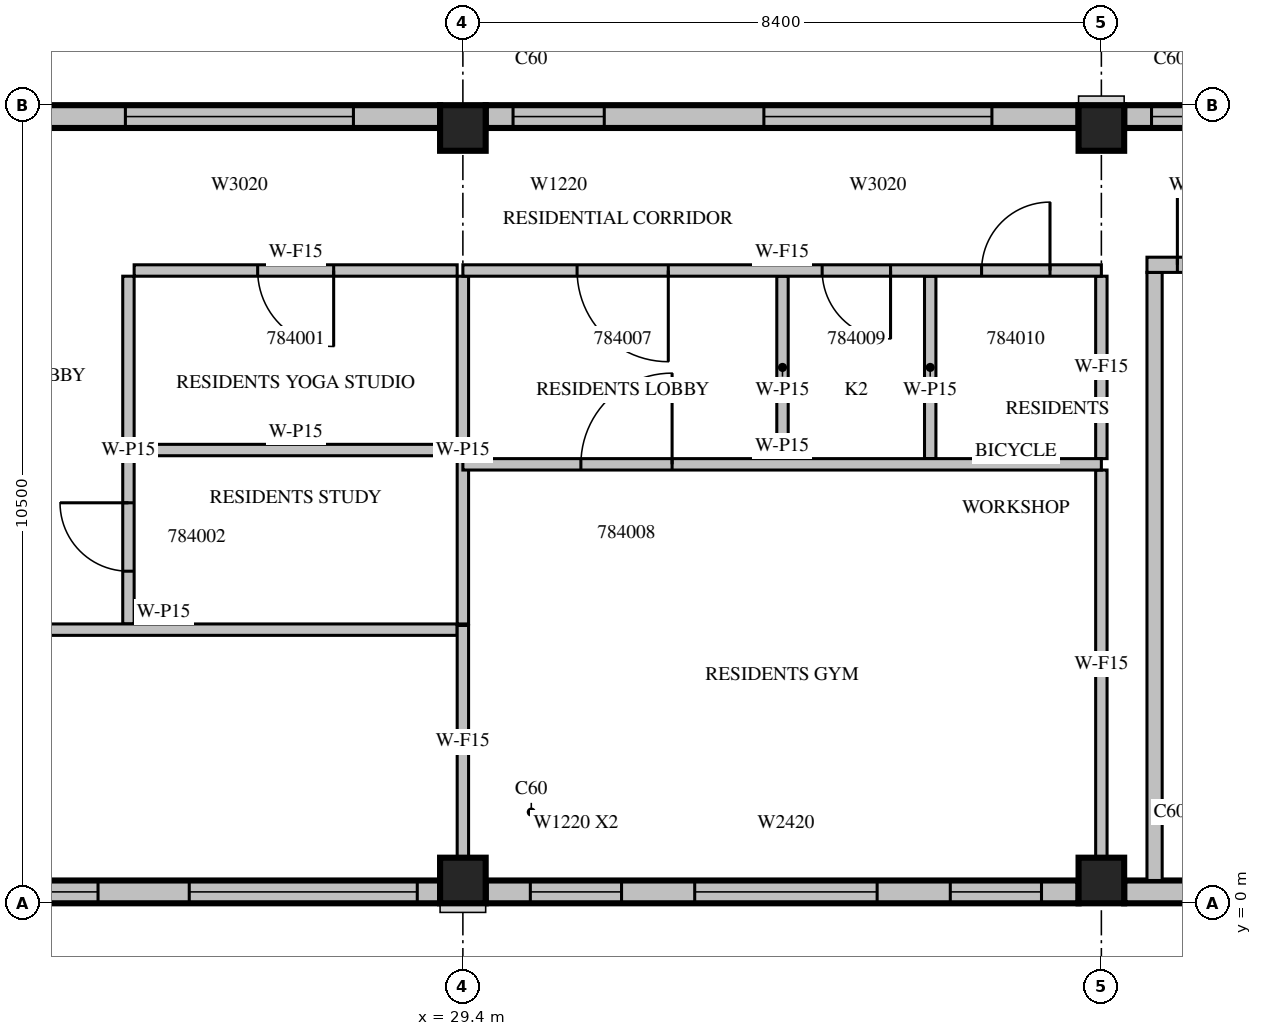
"""IFC4 building model, lengths in metres.
Left out: names, types, materials, properties, quantities, classifications, styles, units other than length and angle.
Written with IfcOpenShell. Run it as: python <this file> out.ifc"""

import sys

from ifc_helpers import new_model, si_unit, direction, frame, frame_2d, origin, origin_2d, place, context, subcontext, project, spatial, rectangle, extrude, source, transform, mapped, element, fill, save


model = new_model("IFC4")
c1 = context("Model", 3, precision=1e-05, world=origin(), true_north=direction((0.0, 1.0)))
c2 = subcontext(c1, "Body", "Model", "MODEL_VIEW")
j1 = project(units=[si_unit("LENGTHUNIT", "METRE"), si_unit("PLANEANGLEUNIT", "RADIAN")], contexts=[c1])
p1 = place(None, origin())
s1 = spatial("IfcSite", under=j1, at=p1, CompositionType="ELEMENT")
p2 = place(p1, origin())
s2 = spatial("IfcBuilding", under=s1, at=p2, CompositionType="ELEMENT")
p3 = place(p2, frame((0.0, 0.0, 354.5)))
s3 = spatial("IfcBuildingStorey", under=s2, at=p3, CompositionType="ELEMENT", Elevation=354.5)
m1 = source(origin(), c2, "Body", "SweptSolid", [
    extrude(rectangle(XDim=0.6, YDim=0.6, at=origin_2d()), origin(), (0.0, 0.0, 1.0), 3.5),
])
for number, where, z_axis, x_axis in (
    (1, (29.4, 0.3, 0.0), (0.0, 0.0, 1.0), (1.0, 0.0, 0.0)),
    (2, (37.8, 0.3, 0.0), (0.0, 0.0, 1.0), (1.0, 0.0, 0.0)),
    (3, (29.4, 10.2, 0.0), (0.0, 0.0, 1.0), (1.0, 0.0, 0.0)),
    (4, (37.8, 10.2, 0.0), (0.0, 0.0, 1.0), (1.0, 0.0, 0.0)),
):
    element("IfcColumn", number, at=place(p3, frame(where, z_axis=z_axis, x_axis=x_axis)), inside=s3, PredefinedType="COLUMN", context=c2, shape_type="MappedRepresentation", body=[
        mapped(m1, transform((0.0, 0.0, 0.0), scale=1.0)),
    ])
m2 = source(origin(), c2, "Body", "SweptSolid", [
    extrude(rectangle(XDim=7.8, YDim=0.3, at=frame_2d((3.9, 0.0))), origin(), (0.0, 0.0, 1.0), 3.1),
])
p4 = place(p3, frame((21.3, 0.15, 0.0), z_axis=(0.0, 0.0, 1.0), x_axis=(1.0, 0.0, 0.0)))
e5 = element("IfcWall", 5, at=p4, inside=s3, PredefinedType="STANDARD", context=c2, shape_type="MappedRepresentation", body=[
    mapped(m2, transform((0.0, 0.0, 0.0), scale=1.0)),
])
m3 = source(origin(), c2, "Body", "SweptSolid", [
    extrude(rectangle(XDim=3.0, YDim=2.0, at=frame_2d((1.5, 1.0))), frame((0.0, 0.16, 0.0), z_axis=(0.0, -1.0, 0.0), x_axis=(1.0, 0.0, 0.0)), (0.0, 0.0, 1.0), 0.32),
])
p5 = place(p4, frame((0.3, 0.0, 0.6)))
e6 = element("IfcOpeningElement", 6, at=p5, cuts=e5, PredefinedType="OPENING", context=c2, shape_type="MappedRepresentation", body=[
    mapped(m3, transform((0.0, 0.0, 0.0), scale=1.0)),
])
p6 = place(p4, frame((4.5, 0.0, 0.6)))
e7 = element("IfcOpeningElement", 7, at=p6, cuts=e5, PredefinedType="OPENING", context=c2, shape_type="MappedRepresentation", body=[
    mapped(m3, transform((0.0, 0.0, 0.0), scale=1.0)),
])
p7 = place(p3, frame((29.7, 0.15, 0.0), z_axis=(0.0, 0.0, 1.0), x_axis=(1.0, 0.0, 0.0)))
e8 = element("IfcWall", 8, at=p7, inside=s3, PredefinedType="STANDARD", context=c2, shape_type="MappedRepresentation", body=[
    mapped(m2, transform((0.0, 0.0, 0.0), scale=1.0)),
])
m4 = source(origin(), c2, "Body", "SweptSolid", [
    extrude(rectangle(XDim=1.2, YDim=2.0, at=frame_2d((0.6, 1.0))), frame((0.0, 0.16, 0.0), z_axis=(0.0, -1.0, 0.0), x_axis=(1.0, 0.0, 0.0)), (0.0, 0.0, 1.0), 0.32),
])
p8 = place(p7, frame((0.588, 0.0, 0.6)))
e9 = element("IfcOpeningElement", 9, at=p8, cuts=e8, PredefinedType="OPENING", context=c2, shape_type="MappedRepresentation", body=[
    mapped(m4, transform((0.0, 0.0, 0.0), scale=1.0)),
])
p9 = place(p7, frame((6.112, 0.0, 0.6)))
e10 = element("IfcOpeningElement", 10, at=p9, cuts=e8, PredefinedType="OPENING", context=c2, shape_type="MappedRepresentation", body=[
    mapped(m4, transform((0.0, 0.0, 0.0), scale=1.0)),
])
m5 = source(origin(), c2, "Body", "SweptSolid", [
    extrude(rectangle(XDim=2.4, YDim=2.0, at=frame_2d((1.2, 1.0))), frame((0.0, 0.16, 0.0), z_axis=(0.0, -1.0, 0.0), x_axis=(1.0, 0.0, 0.0)), (0.0, 0.0, 1.0), 0.32),
])
p10 = place(p7, frame((2.75, 0.0, 0.6)))
e11 = element("IfcOpeningElement", 11, at=p10, cuts=e8, PredefinedType="OPENING", context=c2, shape_type="MappedRepresentation", body=[
    mapped(m5, transform((0.0, 0.0, 0.0), scale=1.0)),
])
m6 = source(origin(), c2, "Body", "SweptSolid", [
    extrude(rectangle(XDim=2.1, YDim=0.3, at=frame_2d((1.05, 0.0))), origin(), (0.0, 0.0, 1.0), 3.1),
])
p11 = place(p3, frame((38.1, 0.15, 0.0), z_axis=(0.0, 0.0, 1.0), x_axis=(1.0, 0.0, 0.0)))
e12 = element("IfcWall", 12, at=p11, inside=s3, PredefinedType="STANDARD", context=c2, shape_type="MappedRepresentation", body=[
    mapped(m6, transform((0.0, 0.0, 0.0), scale=1.0)),
])
p12 = place(p3, frame((45.9, 10.35, 0.0), z_axis=(0.0, 0.0, 1.0), x_axis=(-1.0, 0.0, 0.0)))
e13 = element("IfcWall", 13, at=p12, inside=s3, PredefinedType="STANDARD", context=c2, shape_type="MappedRepresentation", body=[
    mapped(m2, transform((0.0, 0.0, 0.0), scale=1.0)),
])
p13 = place(p12, frame((1.14, 0.0, 0.6)))
e14 = element("IfcOpeningElement", 14, at=p13, cuts=e13, PredefinedType="OPENING", context=c2, shape_type="MappedRepresentation", body=[
    mapped(m3, transform((0.0, 0.0, 0.0), scale=1.0)),
])
p14 = place(p12, frame((6.24, 0.0, 0.6)))
e15 = element("IfcOpeningElement", 15, at=p14, cuts=e13, PredefinedType="OPENING", context=c2, shape_type="MappedRepresentation", body=[
    mapped(m4, transform((0.0, 0.0, 0.0), scale=1.0)),
])
p15 = place(p3, frame((37.5, 10.35, 0.0), z_axis=(0.0, 0.0, 1.0), x_axis=(-1.0, 0.0, 0.0)))
e16 = element("IfcWall", 16, at=p15, inside=s3, PredefinedType="STANDARD", context=c2, shape_type="MappedRepresentation", body=[
    mapped(m2, transform((0.0, 0.0, 0.0), scale=1.0)),
])
p16 = place(p15, frame((1.14, 0.0, 0.6)))
e17 = element("IfcOpeningElement", 17, at=p16, cuts=e16, PredefinedType="OPENING", context=c2, shape_type="MappedRepresentation", body=[
    mapped(m3, transform((0.0, 0.0, 0.0), scale=1.0)),
])
p17 = place(p15, frame((6.24, 0.0, 0.6)))
e18 = element("IfcOpeningElement", 18, at=p17, cuts=e16, PredefinedType="OPENING", context=c2, shape_type="MappedRepresentation", body=[
    mapped(m4, transform((0.0, 0.0, 0.0), scale=1.0)),
])
m7 = source(origin(), c2, "Body", "SweptSolid", [
    extrude(rectangle(XDim=7.5, YDim=0.3, at=frame_2d((3.75, 0.0))), origin(), (0.0, 0.0, 1.0), 3.1),
])
p18 = place(p3, frame((29.1, 10.35, 0.0), z_axis=(0.0, 0.0, 1.0), x_axis=(-1.0, 0.0, 0.0)))
e19 = element("IfcWall", 19, at=p18, inside=s3, PredefinedType="STANDARD", context=c2, shape_type="MappedRepresentation", body=[
    mapped(m7, transform((0.0, 0.0, 0.0), scale=1.0)),
])
p19 = place(p18, frame((1.14, 0.0, 0.6)))
e20 = element("IfcOpeningElement", 20, at=p19, cuts=e19, PredefinedType="OPENING", context=c2, shape_type="MappedRepresentation", body=[
    mapped(m3, transform((0.0, 0.0, 0.0), scale=1.0)),
])
m8 = source(origin(), c2, "Body", "SweptSolid", [
    extrude(rectangle(XDim=1.8, YDim=2.0, at=frame_2d((0.9, 1.0))), frame((0.0, 0.16, 0.0), z_axis=(0.0, -1.0, 0.0), x_axis=(1.0, 0.0, 0.0)), (0.0, 0.0, 1.0), 0.32),
])
p20 = place(p18, frame((5.52, 0.0, 0.6)))
e21 = element("IfcOpeningElement", 21, at=p20, cuts=e19, PredefinedType="OPENING", context=c2, shape_type="MappedRepresentation", body=[
    mapped(m8, transform((0.0, 0.0, 0.0), scale=1.0)),
])
m9 = source(origin(), c2, "Body", "SweptSolid", [
    extrude(rectangle(XDim=8.0, YDim=0.2, at=frame_2d((4.0, 0.0))), origin(), (0.0, 0.0, 1.0), 3.1),
])
p21 = place(p3, frame((38.5, 0.3, 0.0), z_axis=(0.0, 0.0, 1.0), x_axis=(0.0, 1.0, 0.0)))
e22 = element("IfcWall", 22, at=p21, inside=s3, PredefinedType="PARTITIONING", context=c2, shape_type="MappedRepresentation", body=[
    mapped(m9, transform((0.0, 0.0, 0.0), scale=1.0)),
])
m10 = source(origin(), c2, "Body", "SweptSolid", [
    extrude(rectangle(XDim=5.45, YDim=0.2, at=frame_2d((2.725, 0.0))), origin(), (0.0, 0.0, 1.0), 3.1),
])
p22 = place(p3, frame((38.4, 8.4, 0.0), z_axis=(0.0, 0.0, 1.0), x_axis=(1.0, 0.0, 0.0)))
e23 = element("IfcWall", 23, at=p22, inside=s3, PredefinedType="PARTITIONING", context=c2, shape_type="MappedRepresentation", body=[
    mapped(m10, transform((0.0, 0.0, 0.0), scale=1.0)),
])
m11 = source(origin(), c2, "Body", "SweptSolid", [
    extrude(rectangle(XDim=1.2, YDim=2.1, at=frame_2d((0.6, 1.05))), frame((0.0, 0.11, 0.0), z_axis=(0.0, -1.0, 0.0), x_axis=(1.0, 0.0, 0.0)), (0.0, 0.0, 1.0), 0.22),
])
p23 = place(p22, frame((0.4, 0.0, 0.0)))
e24 = element("IfcOpeningElement", 24, at=p23, cuts=e23, PredefinedType="OPENING", context=c2, shape_type="MappedRepresentation", body=[
    mapped(m11, transform((0.0, 0.0, 0.0), scale=1.0)),
])
m12 = source(origin(), c2, "Body", "SweptSolid", [
    extrude(rectangle(XDim=0.9, YDim=2.1, at=frame_2d((0.45, 1.05))), frame((0.0, 0.11, 0.0), z_axis=(0.0, -1.0, 0.0), x_axis=(1.0, 0.0, 0.0)), (0.0, 0.0, 1.0), 0.22),
])
p24 = place(p22, frame((3.25, 0.0, 0.0)))
e25 = element("IfcOpeningElement", 25, at=p24, cuts=e23, PredefinedType="OPENING", context=c2, shape_type="MappedRepresentation", body=[
    mapped(m12, transform((0.0, 0.0, 0.0), scale=1.0)),
])
m13 = source(origin(), c2, "Body", "SweptSolid", [
    extrude(rectangle(XDim=4.575, YDim=0.15, at=frame_2d((2.288, 0.0))), origin(), (0.0, 0.0, 1.0), 3.1),
])
p25 = place(p3, frame((25.0, 8.25, 0.0), z_axis=(0.0, 0.0, 1.0), x_axis=(0.0, -1.0, 0.0)))
e26 = element("IfcWall", 26, at=p25, inside=s3, PredefinedType="PARTITIONING", context=c2, shape_type="MappedRepresentation", body=[
    mapped(m13, transform((0.0, 0.0, 0.0), scale=1.0)),
])
m14 = source(origin(), c2, "Body", "SweptSolid", [
    extrude(rectangle(XDim=0.9, YDim=2.1, at=frame_2d((0.45, 1.05))), frame((0.0, 0.085, 0.0), z_axis=(0.0, -1.0, 0.0), x_axis=(1.0, 0.0, 0.0)), (0.0, 0.0, 1.0), 0.17),
])
p26 = place(p25, frame((2.981, 0.0, 0.0)))
e27 = element("IfcOpeningElement", 27, at=p26, cuts=e26, PredefinedType="OPENING", context=c2, shape_type="MappedRepresentation", body=[
    mapped(m14, transform((0.0, 0.0, 0.0), scale=1.0)),
])
p27 = place(p3, frame((29.4, 3.675, 0.0), z_axis=(0.0, 0.0, 1.0), x_axis=(0.0, 1.0, 0.0)))
e28 = element("IfcWall", 28, at=p27, inside=s3, PredefinedType="PARTITIONING", context=c2, shape_type="MappedRepresentation", body=[
    mapped(m13, transform((0.0, 0.0, 0.0), scale=1.0)),
])
p28 = place(p3, frame((29.325, 8.325, 0.0), z_axis=(0.0, 0.0, 1.0), x_axis=(-1.0, 0.0, 0.0)))
e29 = element("IfcWall", 29, at=p28, inside=s3, PredefinedType="PARTITIONING", context=c2, shape_type="SweptSolid", body=[
    extrude(rectangle(XDim=4.25, YDim=0.15, at=frame_2d((2.125, 0.0))), origin(), (0.0, 0.0, 1.0), 3.1),
])
m15 = source(origin(), c2, "Body", "SweptSolid", [
    extrude(rectangle(XDim=1.0, YDim=2.1, at=frame_2d((0.5, 1.05))), frame((0.0, 0.085, 0.0), z_axis=(0.0, -1.0, 0.0), x_axis=(1.0, 0.0, 0.0)), (0.0, 0.0, 1.0), 0.17),
])
p29 = place(p28, frame((1.625, 0.0, 0.0)))
e30 = element("IfcOpeningElement", 30, at=p29, cuts=e29, PredefinedType="OPENING", context=c2, shape_type="MappedRepresentation", body=[
    mapped(m15, transform((0.0, 0.0, 0.0), scale=1.0)),
])
m16 = source(origin(), c2, "Body", "SweptSolid", [
    extrude(rectangle(XDim=4.25, YDim=0.15, at=frame_2d((2.125, 0.0))), origin(), (0.0, 0.0, 1.0), 3.1),
])
p30 = place(p3, frame((29.325, 5.963, 0.0), z_axis=(0.0, 0.0, 1.0), x_axis=(-1.0, 0.0, 0.0)))
e31 = element("IfcWall", 31, at=p30, inside=s3, PredefinedType="PARTITIONING", context=c2, shape_type="MappedRepresentation", body=[
    mapped(m16, transform((0.0, 0.0, 0.0), scale=1.0)),
])
m17 = source(origin(), c2, "Body", "SweptSolid", [
    extrude(rectangle(XDim=7.725, YDim=0.15, at=frame_2d((3.862, 0.0))), origin(), (0.0, 0.0, 1.0), 3.1),
])
p31 = place(p3, frame((21.6, 3.6, 0.0), z_axis=(0.0, 0.0, 1.0), x_axis=(1.0, 0.0, 0.0)))
e32 = element("IfcWall", 32, at=p31, inside=s3, PredefinedType="PARTITIONING", context=c2, shape_type="MappedRepresentation", body=[
    mapped(m17, transform((0.0, 0.0, 0.0), scale=1.0)),
])
m18 = source(origin(), c2, "Body", "SweptSolid", [
    extrude(rectangle(XDim=1.2, YDim=2.1, at=frame_2d((0.6, 1.05))), frame((0.0, 0.085, 0.0), z_axis=(0.0, -1.0, 0.0), x_axis=(1.0, 0.0, 0.0)), (0.0, 0.0, 1.0), 0.17),
])
p32 = place(p31, frame((1.1, 0.0, 0.0)))
e33 = element("IfcOpeningElement", 33, at=p32, cuts=e32, PredefinedType="OPENING", context=c2, shape_type="MappedRepresentation", body=[
    mapped(m18, transform((0.0, 0.0, 0.0), scale=1.0)),
])
m19 = source(origin(), c2, "Body", "SweptSolid", [
    extrude(rectangle(XDim=2.4, YDim=0.15, at=frame_2d((1.2, 0.0))), origin(), (0.0, 0.0, 1.0), 3.1),
])
for number, where, z_axis, x_axis in (
    (34, (33.605, 5.85, 0.0), (0.0, 0.0, 1.0), (0.0, 1.0, 0.0)),
    (35, (35.548, 5.85, 0.0), (0.0, 0.0, 1.0), (0.0, 1.0, 0.0)),
):
    element("IfcWall", number, at=place(p3, frame(where, z_axis=z_axis, x_axis=x_axis)), inside=s3, PredefinedType="PARTITIONING", context=c2, shape_type="MappedRepresentation", body=[
        mapped(m19, transform((0.0, 0.0, 0.0), scale=1.0)),
    ])
m20 = source(origin(), c2, "Body", "SweptSolid", [
    extrude(rectangle(XDim=3.056, YDim=0.15, at=frame_2d((1.528, 0.0))), origin(), (0.0, 0.0, 1.0), 3.1),
])
p33 = place(p3, frame((29.4, 0.599, 0.0), z_axis=(0.0, 0.0, 1.0), x_axis=(0.0, 1.0, 0.0)))
e36 = element("IfcWall", 36, at=p33, inside=s3, PredefinedType="PARTITIONING", context=c2, shape_type="MappedRepresentation", body=[
    mapped(m20, transform((0.0, 0.0, 0.0), scale=1.0)),
])
p34 = place(p3, frame((37.8, 0.599, 0.0), z_axis=(0.0, 0.0, 1.0), x_axis=(0.0, 1.0, 0.0)))
e37 = element("IfcWall", 37, at=p34, inside=s3, PredefinedType="PARTITIONING", context=c2, shape_type="SweptSolid", body=[
    extrude(rectangle(XDim=5.101, YDim=0.15, at=frame_2d((2.55, 0.0))), origin(), (0.0, 0.0, 1.0), 3.1),
])
p35 = place(p3, frame((37.8, 5.85, 0.0), z_axis=(0.0, 0.0, 1.0), x_axis=(0.0, 1.0, 0.0)))
e38 = element("IfcWall", 38, at=p35, inside=s3, PredefinedType="PARTITIONING", context=c2, shape_type="MappedRepresentation", body=[
    mapped(m19, transform((0.0, 0.0, 0.0), scale=1.0)),
])
m21 = source(origin(), c2, "Body", "SweptSolid", [
    extrude(rectangle(XDim=8.4, YDim=0.15, at=frame_2d((4.2, 0.0))), origin(), (0.0, 0.0, 1.0), 3.1),
])
p36 = place(p3, frame((37.8, 5.775, 0.0), z_axis=(0.0, 0.0, 1.0), x_axis=(-1.0, 0.0, 0.0)))
e39 = element("IfcWall", 39, at=p36, inside=s3, PredefinedType="PARTITIONING", context=c2, shape_type="MappedRepresentation", body=[
    mapped(m21, transform((0.0, 0.0, 0.0), scale=1.0)),
])
p37 = place(p36, frame((5.648, 0.0, 0.0)))
e40 = element("IfcOpeningElement", 40, at=p37, cuts=e39, PredefinedType="OPENING", context=c2, shape_type="MappedRepresentation", body=[
    mapped(m18, transform((0.0, 0.0, 0.0), scale=1.0)),
])
p38 = place(p3, frame((37.8, 8.325, 0.0), z_axis=(0.0, 0.0, 1.0), x_axis=(-1.0, 0.0, 0.0)))
e41 = element("IfcWall", 41, at=p38, inside=s3, PredefinedType="PARTITIONING", context=c2, shape_type="MappedRepresentation", body=[
    mapped(m21, transform((0.0, 0.0, 0.0), scale=1.0)),
])
p39 = place(p38, frame((5.698, 0.0, 0.0)))
e42 = element("IfcOpeningElement", 42, at=p39, cuts=e41, PredefinedType="OPENING", context=c2, shape_type="MappedRepresentation", body=[
    mapped(m18, transform((0.0, 0.0, 0.0), scale=1.0)),
])
p40 = place(p38, frame((2.773, 0.0, 0.0)))
e43 = element("IfcOpeningElement", 43, at=p40, cuts=e41, PredefinedType="OPENING", context=c2, shape_type="MappedRepresentation", body=[
    mapped(m14, transform((0.0, 0.0, 0.0), scale=1.0)),
])
p41 = place(p38, frame((0.676, 0.0, 0.0)))
e44 = element("IfcOpeningElement", 44, at=p41, cuts=e41, PredefinedType="OPENING", context=c2, shape_type="MappedRepresentation", body=[
    mapped(m14, transform((0.0, 0.0, 0.0), scale=1.0)),
])
m22 = source(origin(), c2, "Body", "SweptSolid", [
    extrude(rectangle(XDim=3.0, YDim=2.0, at=frame_2d((1.5, 1.0))), frame((0.0, 0.03, 0.0), z_axis=(0.0, -1.0, 0.0), x_axis=(1.0, 0.0, 0.0)), (0.0, 0.0, 1.0), 0.06),
])
p42 = place(p5, origin())
e45 = element("IfcWindow", 45, at=p42, inside=s3, PartitioningType="SINGLE_PANEL", PredefinedType="WINDOW", context=c2, shape_type="MappedRepresentation", body=[
    mapped(m22, transform((0.0, 0.0, 0.0), scale=1.0)),
])
fill(e6, e45)
p43 = place(p6, origin())
e46 = element("IfcWindow", 46, at=p43, inside=s3, PartitioningType="SINGLE_PANEL", PredefinedType="WINDOW", context=c2, shape_type="MappedRepresentation", body=[
    mapped(m22, transform((0.0, 0.0, 0.0), scale=1.0)),
])
fill(e7, e46)
m23 = source(origin(), c2, "Body", "SweptSolid", [
    extrude(rectangle(XDim=1.2, YDim=2.0, at=frame_2d((0.6, 1.0))), frame((0.0, 0.03, 0.0), z_axis=(0.0, -1.0, 0.0), x_axis=(1.0, 0.0, 0.0)), (0.0, 0.0, 1.0), 0.06),
])
p44 = place(p8, origin())
e47 = element("IfcWindow", 47, at=p44, inside=s3, PartitioningType="SINGLE_PANEL", PredefinedType="WINDOW", context=c2, shape_type="MappedRepresentation", body=[
    mapped(m23, transform((0.0, 0.0, 0.0), scale=1.0)),
])
fill(e9, e47)
p45 = place(p9, origin())
e48 = element("IfcWindow", 48, at=p45, inside=s3, PartitioningType="SINGLE_PANEL", PredefinedType="WINDOW", context=c2, shape_type="MappedRepresentation", body=[
    mapped(m23, transform((0.0, 0.0, 0.0), scale=1.0)),
])
fill(e10, e48)
m24 = source(origin(), c2, "Body", "SweptSolid", [
    extrude(rectangle(XDim=2.4, YDim=2.0, at=frame_2d((1.2, 1.0))), frame((0.0, 0.03, 0.0), z_axis=(0.0, -1.0, 0.0), x_axis=(1.0, 0.0, 0.0)), (0.0, 0.0, 1.0), 0.06),
])
p46 = place(p10, origin())
e49 = element("IfcWindow", 49, at=p46, inside=s3, PartitioningType="SINGLE_PANEL", PredefinedType="WINDOW", context=c2, shape_type="MappedRepresentation", body=[
    mapped(m24, transform((0.0, 0.0, 0.0), scale=1.0)),
])
fill(e11, e49)
p47 = place(p14, origin())
e50 = element("IfcWindow", 50, at=p47, inside=s3, PartitioningType="SINGLE_PANEL", PredefinedType="WINDOW", context=c2, shape_type="MappedRepresentation", body=[
    mapped(m23, transform((0.0, 0.0, 0.0), scale=1.0)),
])
fill(e15, e50)
p48 = place(p16, origin())
e51 = element("IfcWindow", 51, at=p48, inside=s3, PartitioningType="SINGLE_PANEL", PredefinedType="WINDOW", context=c2, shape_type="MappedRepresentation", body=[
    mapped(m22, transform((0.0, 0.0, 0.0), scale=1.0)),
])
fill(e17, e51)
p49 = place(p17, origin())
e52 = element("IfcWindow", 52, at=p49, inside=s3, PartitioningType="SINGLE_PANEL", PredefinedType="WINDOW", context=c2, shape_type="MappedRepresentation", body=[
    mapped(m23, transform((0.0, 0.0, 0.0), scale=1.0)),
])
fill(e18, e52)
p50 = place(p19, origin())
e53 = element("IfcWindow", 53, at=p50, inside=s3, PartitioningType="SINGLE_PANEL", PredefinedType="WINDOW", context=c2, shape_type="MappedRepresentation", body=[
    mapped(m22, transform((0.0, 0.0, 0.0), scale=1.0)),
])
fill(e20, e53)
m25 = source(origin(), c2, "Body", "SweptSolid", [
    extrude(rectangle(XDim=1.2, YDim=2.1, at=frame_2d((0.6, 1.05))), frame((0.0, 0.025, 0.0), z_axis=(0.0, -1.0, 0.0), x_axis=(1.0, 0.0, 0.0)), (0.0, 0.0, 1.0), 0.05),
])
p51 = place(p23, origin())
e54 = element("IfcDoor", 54, at=p51, inside=s3, OperationType="SINGLE_SWING_LEFT", PredefinedType="DOOR", context=c2, shape_type="MappedRepresentation", body=[
    mapped(m25, transform((0.0, 0.0, 0.0), scale=1.0)),
])
fill(e24, e54)
m26 = source(origin(), c2, "Body", "SweptSolid", [
    extrude(rectangle(XDim=1.0, YDim=2.1, at=frame_2d((0.5, 1.05))), frame((0.0, 0.025, 0.0), z_axis=(0.0, -1.0, 0.0), x_axis=(1.0, 0.0, 0.0)), (0.0, 0.0, 1.0), 0.05),
])
p52 = place(p29, origin())
e55 = element("IfcDoor", 55, at=p52, inside=s3, OperationType="SINGLE_SWING_LEFT", PredefinedType="DOOR", context=c2, shape_type="MappedRepresentation", body=[
    mapped(m26, transform((0.0, 0.0, 0.0), scale=1.0)),
])
fill(e30, e55)
m27 = source(origin(), c2, "Body", "SweptSolid", [
    extrude(rectangle(XDim=0.9, YDim=2.1, at=frame_2d((0.45, 1.05))), frame((0.0, 0.025, 0.0), z_axis=(0.0, -1.0, 0.0), x_axis=(1.0, 0.0, 0.0)), (0.0, 0.0, 1.0), 0.05),
])
p53 = place(p26, origin())
e56 = element("IfcDoor", 56, at=p53, inside=s3, OperationType="SINGLE_SWING_RIGHT", PredefinedType="DOOR", context=c2, shape_type="MappedRepresentation", body=[
    mapped(m27, transform((0.0, 0.0, 0.0), scale=1.0)),
])
fill(e27, e56)
p54 = place(p39, origin())
e57 = element("IfcDoor", 57, at=p54, inside=s3, OperationType="SINGLE_SWING_LEFT", PredefinedType="DOOR", context=c2, shape_type="MappedRepresentation", body=[
    mapped(m25, transform((0.0, 0.0, 0.0), scale=1.0)),
])
fill(e42, e57)
p55 = place(p37, origin())
e58 = element("IfcDoor", 58, at=p55, inside=s3, OperationType="SINGLE_SWING_RIGHT", PredefinedType="DOOR", context=c2, shape_type="MappedRepresentation", body=[
    mapped(m25, transform((0.0, 0.0, 0.0), scale=1.0)),
])
fill(e40, e58)
p56 = place(p40, origin())
e59 = element("IfcDoor", 59, at=p56, inside=s3, OperationType="SINGLE_SWING_LEFT", PredefinedType="DOOR", context=c2, shape_type="MappedRepresentation", body=[
    mapped(m27, transform((0.0, 0.0, 0.0), scale=1.0)),
])
fill(e43, e59)
p57 = place(p41, origin())
e60 = element("IfcDoor", 60, at=p57, inside=s3, OperationType="SINGLE_SWING_RIGHT", PredefinedType="DOOR", context=c2, shape_type="MappedRepresentation", body=[
    mapped(m27, transform((0.0, 0.0, 0.0), scale=1.0)),
])
fill(e44, e60)
save(model, sys.argv[1])
